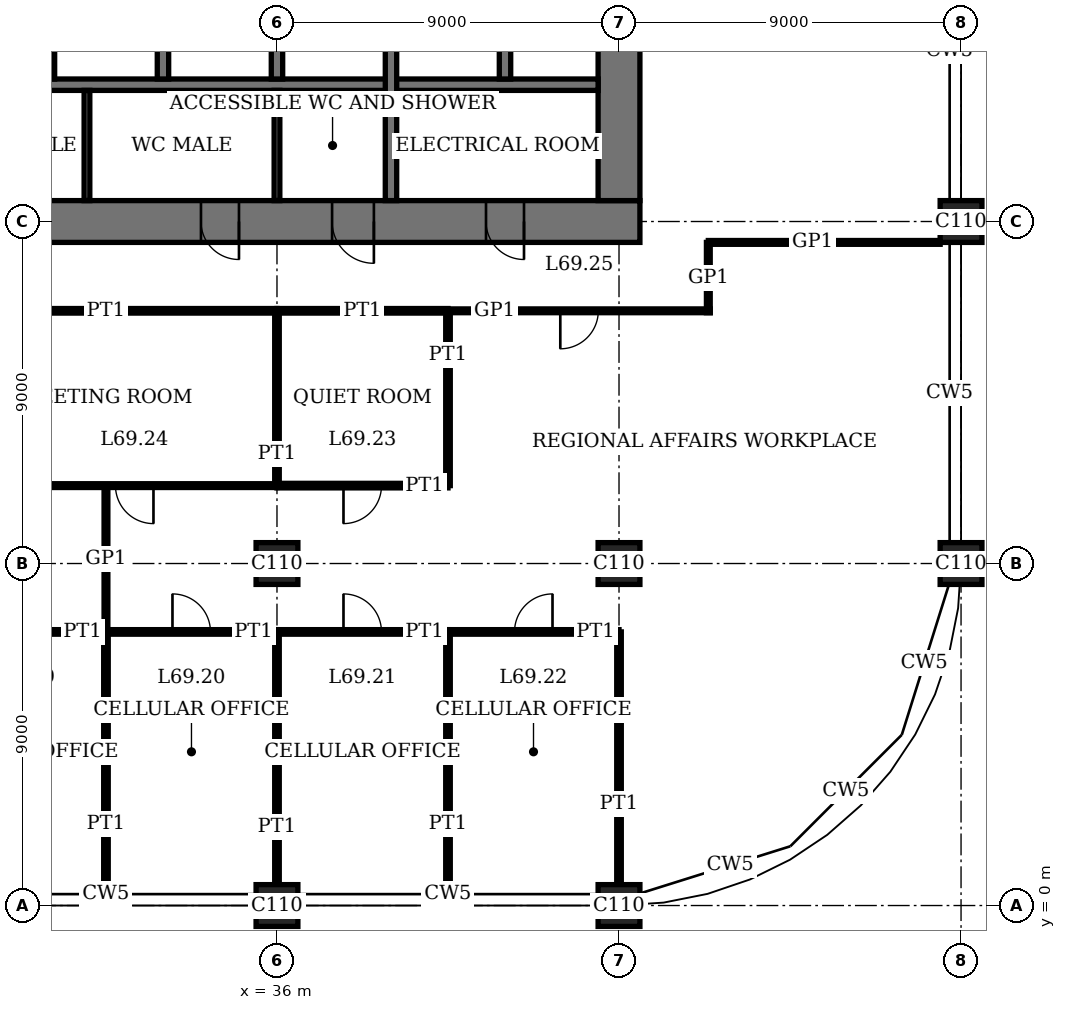
"""IFC4 building model, lengths in metres.
Left out: names, types, materials, properties, quantities, classifications, styles, units other than length and angle.
Written with IfcOpenShell. Run it as: python <this file> out.ifc"""

import sys

from ifc_helpers import new_model, si_unit, direction, frame, frame_2d, origin, origin_2d, place, context, subcontext, project, spatial, rectangle, extrude, element, fill, save


model = new_model("IFC4")
c1 = context("Model", 3, precision=1e-05, world=origin(), true_north=direction((0.0, 1.0)))
c2 = subcontext(c1, "Body", "Model", "MODEL_VIEW")
j1 = project(units=[si_unit("LENGTHUNIT", "METRE"), si_unit("PLANEANGLEUNIT", "RADIAN")], contexts=[c1])
p1 = place(None, origin())
s1 = spatial("IfcSite", under=j1, at=p1, CompositionType="ELEMENT")
p2 = place(p1, origin())
s2 = spatial("IfcBuilding", under=s1, at=p2, CompositionType="ELEMENT")
p3 = place(p2, frame((0.0, 0.0, 283.4)))
s3 = spatial("IfcBuildingStorey", under=s2, at=p3, CompositionType="ELEMENT", Elevation=283.4)
for number, where, z_axis, x_axis in (
    (1, (36.0, 0.0, 0.0), (0.0, 0.0, 1.0), (1.0, 0.0, 0.0)),
    (2, (36.0, 9.0, 0.0), (0.0, 0.0, 1.0), (1.0, 0.0, 0.0)),
    (3, (45.0, 0.0, 0.0), (0.0, 0.0, 1.0), (1.0, 0.0, 0.0)),
    (4, (45.0, 9.0, 0.0), (0.0, 0.0, 1.0), (1.0, 0.0, 0.0)),
    (5, (54.0, 9.0, 0.0), (0.0, 0.0, 1.0), (1.0, 0.0, 0.0)),
    (6, (54.0, 18.0, 0.0), (0.0, 0.0, 1.0), (1.0, 0.0, 0.0)),
):
    element("IfcColumn", number, at=place(p3, frame(where, z_axis=z_axis, x_axis=x_axis)), inside=s3, PredefinedType="COLUMN", context=c2, shape_type="SweptSolid", body=[
        extrude(rectangle(XDim=1.1, YDim=1.1, at=origin_2d()), origin(), (0.0, 0.0, 1.0), 4.0),
    ])
p4 = place(p3, frame((17.45, 18.0, 0.0), z_axis=(0.0, 0.0, 1.0), x_axis=(1.0, 0.0, 0.0)))
e7 = element("IfcWall", 7, at=p4, inside=s3, PredefinedType="SHEAR", context=c2, shape_type="SweptSolid", body=[
    extrude(rectangle(XDim=28.1, YDim=1.1, at=frame_2d((14.05, 0.0))), origin(), (0.0, 0.0, 1.0), 4.0),
])
p5 = place(p4, frame((11.55, 0.0, 0.0)))
e8 = element("IfcOpeningElement", 8, at=p5, cuts=e7, PredefinedType="OPENING", context=c2, shape_type="SweptSolid", body=[
    extrude(rectangle(XDim=1.0, YDim=2.4, at=frame_2d((0.5, 1.2))), frame((0.0, 0.56, 0.0), z_axis=(0.0, -1.0, 0.0), x_axis=(1.0, 0.0, 0.0)), (0.0, 0.0, 1.0), 1.12),
])
p6 = place(p4, frame((16.55, 0.0, 0.0)))
e9 = element("IfcOpeningElement", 9, at=p6, cuts=e7, PredefinedType="OPENING", context=c2, shape_type="SweptSolid", body=[
    extrude(rectangle(XDim=1.0, YDim=2.4, at=frame_2d((0.5, 1.2))), frame((0.0, 0.56, 0.0), z_axis=(0.0, -1.0, 0.0), x_axis=(1.0, 0.0, 0.0)), (0.0, 0.0, 1.0), 1.12),
])
p7 = place(p4, frame((20.0, 0.0, 0.0)))
e10 = element("IfcOpeningElement", 10, at=p7, cuts=e7, PredefinedType="OPENING", context=c2, shape_type="SweptSolid", body=[
    extrude(rectangle(XDim=1.1, YDim=2.4, at=frame_2d((0.55, 1.2))), frame((0.0, 0.56, 0.0), z_axis=(0.0, -1.0, 0.0), x_axis=(1.0, 0.0, 0.0)), (0.0, 0.0, 1.0), 1.12),
])
p8 = place(p4, frame((24.05, 0.0, 0.0)))
e11 = element("IfcOpeningElement", 11, at=p8, cuts=e7, PredefinedType="OPENING", context=c2, shape_type="SweptSolid", body=[
    extrude(rectangle(XDim=1.0, YDim=2.4, at=frame_2d((0.5, 1.2))), frame((0.0, 0.56, 0.0), z_axis=(0.0, -1.0, 0.0), x_axis=(1.0, 0.0, 0.0)), (0.0, 0.0, 1.0), 1.12),
])
p9 = place(p3, frame((45.0, 18.55, 0.0), z_axis=(0.0, 0.0, 1.0), x_axis=(0.0, 1.0, 0.0)))
e12 = element("IfcWall", 12, at=p9, inside=s3, PredefinedType="SHEAR", context=c2, shape_type="SweptSolid", body=[
    extrude(rectangle(XDim=16.9, YDim=1.1, at=frame_2d((8.45, 0.0))), origin(), (0.0, 0.0, 1.0), 4.0),
])
p10 = place(p9, frame((8.45, 0.0, 0.0)))
e13 = element("IfcOpeningElement", 13, at=p10, cuts=e12, PredefinedType="OPENING", context=c2, shape_type="SweptSolid", body=[
    extrude(rectangle(XDim=1.8, YDim=2.4, at=frame_2d((0.9, 1.2))), frame((0.0, 0.56, 0.0), z_axis=(0.0, -1.0, 0.0), x_axis=(1.0, 0.0, 0.0)), (0.0, 0.0, 1.0), 1.12),
])
p11 = place(p3, frame((27.15, 21.6, 0.0), z_axis=(0.0, 0.0, 1.0), x_axis=(1.0, 0.0, 0.0)))
e14 = element("IfcWall", 14, at=p11, inside=s3, PredefinedType="SHEAR", context=c2, shape_type="SweptSolid", body=[
    extrude(rectangle(XDim=17.3, YDim=0.3, at=frame_2d((8.65, 0.0))), origin(), (0.0, 0.0, 1.0), 4.0),
])
for number, where, z_axis, x_axis in (
    (15, (30.0, 21.75, 0.0), (0.0, 0.0, 1.0), (0.0, 1.0, 0.0)),
    (16, (33.0, 21.75, 0.0), (0.0, 0.0, 1.0), (0.0, 1.0, 0.0)),
    (17, (36.0, 21.75, 0.0), (0.0, 0.0, 1.0), (0.0, 1.0, 0.0)),
):
    element("IfcWall", number, at=place(p3, frame(where, z_axis=z_axis, x_axis=x_axis)), inside=s3, PredefinedType="SHEAR", context=c2, shape_type="SweptSolid", body=[
        extrude(rectangle(XDim=2.7, YDim=0.3, at=frame_2d((1.35, 0.0))), origin(), (0.0, 0.0, 1.0), 4.0),
    ])
p12 = place(p3, frame((39.0, 18.55, 0.0), z_axis=(0.0, 0.0, 1.0), x_axis=(0.0, 1.0, 0.0)))
e18 = element("IfcWall", 18, at=p12, inside=s3, PredefinedType="SHEAR", context=c2, shape_type="SweptSolid", body=[
    extrude(rectangle(XDim=5.9, YDim=0.3, at=frame_2d((2.95, 0.0))), origin(), (0.0, 0.0, 1.0), 4.0),
])
p13 = place(p3, frame((42.0, 21.75, 0.0), z_axis=(0.0, 0.0, 1.0), x_axis=(0.0, 1.0, 0.0)))
e19 = element("IfcWall", 19, at=p13, inside=s3, PredefinedType="SHEAR", context=c2, shape_type="SweptSolid", body=[
    extrude(rectangle(XDim=2.7, YDim=0.3, at=frame_2d((1.35, 0.0))), origin(), (0.0, 0.0, 1.0), 4.0),
])
p14 = place(p3, frame((27.0, 7.2, 0.0), z_axis=(0.0, 0.0, 1.0), x_axis=(1.0, 0.0, 0.0)))
e20 = element("IfcWall", 20, at=p14, inside=s3, PredefinedType="PARTITIONING", context=c2, shape_type="SweptSolid", body=[
    extrude(rectangle(XDim=4.5, YDim=0.12, at=frame_2d((2.25, 0.0))), origin(), (0.0, 0.0, 1.0), 3.75),
])
p15 = place(p14, frame((1.75, 0.0, 0.0)))
e21 = element("IfcOpeningElement", 21, at=p15, cuts=e20, PredefinedType="OPENING", context=c2, shape_type="SweptSolid", body=[
    extrude(rectangle(XDim=1.0, YDim=2.4, at=frame_2d((0.5, 1.2))), frame((0.0, 0.07, 0.0), z_axis=(0.0, -1.0, 0.0), x_axis=(1.0, 0.0, 0.0)), (0.0, 0.0, 1.0), 0.14),
])
p16 = place(p3, frame((31.5, 7.2, 0.0), z_axis=(0.0, 0.0, 1.0), x_axis=(1.0, 0.0, 0.0)))
e22 = element("IfcWall", 22, at=p16, inside=s3, PredefinedType="PARTITIONING", context=c2, shape_type="SweptSolid", body=[
    extrude(rectangle(XDim=4.5, YDim=0.12, at=frame_2d((2.25, 0.0))), origin(), (0.0, 0.0, 1.0), 3.75),
])
p17 = place(p16, frame((1.75, 0.0, 0.0)))
e23 = element("IfcOpeningElement", 23, at=p17, cuts=e22, PredefinedType="OPENING", context=c2, shape_type="SweptSolid", body=[
    extrude(rectangle(XDim=1.0, YDim=2.4, at=frame_2d((0.5, 1.2))), frame((0.0, 0.07, 0.0), z_axis=(0.0, -1.0, 0.0), x_axis=(1.0, 0.0, 0.0)), (0.0, 0.0, 1.0), 0.14),
])
p18 = place(p3, frame((36.0, 7.2, 0.0), z_axis=(0.0, 0.0, 1.0), x_axis=(1.0, 0.0, 0.0)))
e24 = element("IfcWall", 24, at=p18, inside=s3, PredefinedType="PARTITIONING", context=c2, shape_type="SweptSolid", body=[
    extrude(rectangle(XDim=4.5, YDim=0.12, at=frame_2d((2.25, 0.0))), origin(), (0.0, 0.0, 1.0), 3.75),
])
p19 = place(p18, frame((1.75, 0.0, 0.0)))
e25 = element("IfcOpeningElement", 25, at=p19, cuts=e24, PredefinedType="OPENING", context=c2, shape_type="SweptSolid", body=[
    extrude(rectangle(XDim=1.0, YDim=2.4, at=frame_2d((0.5, 1.2))), frame((0.0, 0.07, 0.0), z_axis=(0.0, -1.0, 0.0), x_axis=(1.0, 0.0, 0.0)), (0.0, 0.0, 1.0), 0.14),
])
p20 = place(p3, frame((40.5, 7.2, 0.0), z_axis=(0.0, 0.0, 1.0), x_axis=(1.0, 0.0, 0.0)))
e26 = element("IfcWall", 26, at=p20, inside=s3, PredefinedType="PARTITIONING", context=c2, shape_type="SweptSolid", body=[
    extrude(rectangle(XDim=4.5, YDim=0.12, at=frame_2d((2.25, 0.0))), origin(), (0.0, 0.0, 1.0), 3.75),
])
p21 = place(p20, frame((1.75, 0.0, 0.0)))
e27 = element("IfcOpeningElement", 27, at=p21, cuts=e26, PredefinedType="OPENING", context=c2, shape_type="SweptSolid", body=[
    extrude(rectangle(XDim=1.0, YDim=2.4, at=frame_2d((0.5, 1.2))), frame((0.0, 0.07, 0.0), z_axis=(0.0, -1.0, 0.0), x_axis=(1.0, 0.0, 0.0)), (0.0, 0.0, 1.0), 0.14),
])
p22 = place(p3, frame((36.0, 11.05, 0.0), z_axis=(0.0, 0.0, 1.0), x_axis=(1.0, 0.0, 0.0)))
e28 = element("IfcWall", 28, at=p22, inside=s3, PredefinedType="PARTITIONING", context=c2, shape_type="SweptSolid", body=[
    extrude(rectangle(XDim=4.5, YDim=0.12, at=frame_2d((2.25, 0.0))), origin(), (0.0, 0.0, 1.0), 3.75),
])
p23 = place(p22, frame((1.75, 0.0, 0.0)))
e29 = element("IfcOpeningElement", 29, at=p23, cuts=e28, PredefinedType="OPENING", context=c2, shape_type="SweptSolid", body=[
    extrude(rectangle(XDim=1.0, YDim=2.4, at=frame_2d((0.5, 1.2))), frame((0.0, 0.07, 0.0), z_axis=(0.0, -1.0, 0.0), x_axis=(1.0, 0.0, 0.0)), (0.0, 0.0, 1.0), 0.14),
])
p24 = place(p3, frame((27.0, 11.05, 0.0), z_axis=(0.0, 0.0, 1.0), x_axis=(1.0, 0.0, 0.0)))
e30 = element("IfcWall", 30, at=p24, inside=s3, PredefinedType="PARTITIONING", context=c2, shape_type="SweptSolid", body=[
    extrude(rectangle(XDim=9.0, YDim=0.1, at=frame_2d((4.5, 0.0))), origin(), (0.0, 0.0, 1.0), 3.75),
])
p25 = place(p24, frame((4.75, 0.0, 0.0)))
e31 = element("IfcOpeningElement", 31, at=p25, cuts=e30, PredefinedType="OPENING", context=c2, shape_type="SweptSolid", body=[
    extrude(rectangle(XDim=1.0, YDim=2.4, at=frame_2d((0.5, 1.2))), frame((0.0, 0.06, 0.0), z_axis=(0.0, -1.0, 0.0), x_axis=(1.0, 0.0, 0.0)), (0.0, 0.0, 1.0), 0.12),
])
p26 = place(p3, frame((27.0, 15.65, 0.0), z_axis=(0.0, 0.0, 1.0), x_axis=(1.0, 0.0, 0.0)))
e32 = element("IfcWall", 32, at=p26, inside=s3, PredefinedType="PARTITIONING", context=c2, shape_type="SweptSolid", body=[
    extrude(rectangle(XDim=9.0, YDim=0.12, at=frame_2d((4.5, 0.0))), origin(), (0.0, 0.0, 1.0), 3.75),
])
p27 = place(p3, frame((36.0, 15.65, 0.0), z_axis=(0.0, 0.0, 1.0), x_axis=(1.0, 0.0, 0.0)))
e33 = element("IfcWall", 33, at=p27, inside=s3, PredefinedType="PARTITIONING", context=c2, shape_type="SweptSolid", body=[
    extrude(rectangle(XDim=4.5, YDim=0.12, at=frame_2d((2.25, 0.0))), origin(), (0.0, 0.0, 1.0), 3.75),
])
p28 = place(p3, frame((40.51, 15.65, 0.0), z_axis=(0.0, 0.0, 1.0), x_axis=(1.0, 0.0, 0.0)))
e34 = element("IfcWall", 34, at=p28, inside=s3, PredefinedType="PARTITIONING", context=c2, shape_type="SweptSolid", body=[
    extrude(rectangle(XDim=6.89, YDim=0.1, at=frame_2d((3.445, 0.0))), origin(), (0.0, 0.0, 1.0), 3.75),
])
p29 = place(p28, frame((2.945, 0.0, 0.0)))
e35 = element("IfcOpeningElement", 35, at=p29, cuts=e34, PredefinedType="OPENING", context=c2, shape_type="SweptSolid", body=[
    extrude(rectangle(XDim=1.0, YDim=2.4, at=frame_2d((0.5, 1.2))), frame((0.0, 0.06, 0.0), z_axis=(0.0, -1.0, 0.0), x_axis=(1.0, 0.0, 0.0)), (0.0, 0.0, 1.0), 0.12),
])
p30 = place(p3, frame((47.35, 17.45, 0.0), z_axis=(0.0, 0.0, 1.0), x_axis=(1.0, 0.0, 0.0)))
e36 = element("IfcWall", 36, at=p30, inside=s3, PredefinedType="PARTITIONING", context=c2, shape_type="SweptSolid", body=[
    extrude(rectangle(XDim=6.1, YDim=0.1, at=frame_2d((3.05, 0.0))), origin(), (0.0, 0.0, 1.0), 3.75),
])
p31 = place(p3, frame((31.5, 0.31, 0.0), z_axis=(0.0, 0.0, 1.0), x_axis=(0.0, 1.0, 0.0)))
e37 = element("IfcWall", 37, at=p31, inside=s3, PredefinedType="PARTITIONING", context=c2, shape_type="SweptSolid", body=[
    extrude(rectangle(XDim=6.89, YDim=0.12, at=frame_2d((3.445, 0.0))), origin(), (0.0, 0.0, 1.0), 3.75),
])
p32 = place(p3, frame((31.5, 7.2, 0.0), z_axis=(0.0, 0.0, 1.0), x_axis=(0.0, 1.0, 0.0)))
e38 = element("IfcWall", 38, at=p32, inside=s3, PredefinedType="PARTITIONING", context=c2, shape_type="SweptSolid", body=[
    extrude(rectangle(XDim=3.86, YDim=0.1, at=frame_2d((1.93, 0.0))), origin(), (0.0, 0.0, 1.0), 3.75),
])
p33 = place(p3, frame((36.0, 0.55, 0.0), z_axis=(0.0, 0.0, 1.0), x_axis=(0.0, 1.0, 0.0)))
e39 = element("IfcWall", 39, at=p33, inside=s3, PredefinedType="PARTITIONING", context=c2, shape_type="SweptSolid", body=[
    extrude(rectangle(XDim=6.65, YDim=0.12, at=frame_2d((3.325, 0.0))), origin(), (0.0, 0.0, 1.0), 3.05),
])
p34 = place(p3, frame((36.0, 11.05, 0.0), z_axis=(0.0, 0.0, 1.0), x_axis=(0.0, 1.0, 0.0)))
e40 = element("IfcWall", 40, at=p34, inside=s3, PredefinedType="PARTITIONING", context=c2, shape_type="SweptSolid", body=[
    extrude(rectangle(XDim=4.6, YDim=0.12, at=frame_2d((2.3, 0.0))), origin(), (0.0, 0.0, 1.0), 3.05),
])
p35 = place(p3, frame((40.5, 0.31, 0.0), z_axis=(0.0, 0.0, 1.0), x_axis=(0.0, 1.0, 0.0)))
e41 = element("IfcWall", 41, at=p35, inside=s3, PredefinedType="PARTITIONING", context=c2, shape_type="SweptSolid", body=[
    extrude(rectangle(XDim=6.89, YDim=0.12, at=frame_2d((3.445, 0.0))), origin(), (0.0, 0.0, 1.0), 3.75),
])
p36 = place(p3, frame((40.5, 11.05, 0.0), z_axis=(0.0, 0.0, 1.0), x_axis=(0.0, 1.0, 0.0)))
e42 = element("IfcWall", 42, at=p36, inside=s3, PredefinedType="PARTITIONING", context=c2, shape_type="SweptSolid", body=[
    extrude(rectangle(XDim=4.6, YDim=0.12, at=frame_2d((2.3, 0.0))), origin(), (0.0, 0.0, 1.0), 3.75),
])
p37 = place(p3, frame((45.0, 0.55, 0.0), z_axis=(0.0, 0.0, 1.0), x_axis=(0.0, 1.0, 0.0)))
e43 = element("IfcWall", 43, at=p37, inside=s3, PredefinedType="PARTITIONING", context=c2, shape_type="SweptSolid", body=[
    extrude(rectangle(XDim=6.65, YDim=0.12, at=frame_2d((3.325, 0.0))), origin(), (0.0, 0.0, 1.0), 3.05),
])
p38 = place(p3, frame((47.35, 15.6, 0.0), z_axis=(0.0, 0.0, 1.0), x_axis=(0.0, 1.0, 0.0)))
e44 = element("IfcWall", 44, at=p38, inside=s3, PredefinedType="PARTITIONING", context=c2, shape_type="SweptSolid", body=[
    extrude(rectangle(XDim=1.85, YDim=0.1, at=frame_2d((0.925, 0.0))), origin(), (0.0, 0.0, 1.0), 3.75),
])
for number, where, z_axis, x_axis in (
    (45, (31.0, 18.55, 0.0), (0.0, 0.0, 1.0), (0.0, 1.0, 0.0)),
    (46, (36.0, 18.55, 0.0), (0.0, 0.0, 1.0), (0.0, 1.0, 0.0)),
):
    element("IfcWall", number, at=place(p3, frame(where, z_axis=z_axis, x_axis=x_axis)), inside=s3, PredefinedType="PARTITIONING", context=c2, shape_type="SweptSolid", body=[
        extrude(rectangle(XDim=2.9, YDim=0.15, at=frame_2d((1.45, 0.0))), origin(), (0.0, 0.0, 1.0), 3.75),
    ])
p39 = place(p6, origin())
e47 = element("IfcDoor", 47, at=p39, inside=s3, OperationType="SINGLE_SWING_RIGHT", PredefinedType="DOOR", context=c2, shape_type="SweptSolid", body=[
    extrude(rectangle(XDim=1.0, YDim=2.4, at=frame_2d((0.5, 1.2))), frame((0.0, 0.025, 0.0), z_axis=(0.0, -1.0, 0.0), x_axis=(1.0, 0.0, 0.0)), (0.0, 0.0, 1.0), 0.05),
    extrude(rectangle(XDim=0.04, YDim=2.4, at=frame_2d((0.02, 1.2))), frame((0.0, 0.4, 0.0), z_axis=(0.0, -1.0, 0.0), x_axis=(1.0, 0.0, 0.0)), (0.0, 0.0, 1.0), 0.8),
    extrude(rectangle(XDim=0.04, YDim=2.4, at=frame_2d((0.98, 1.2))), frame((0.0, 0.4, 0.0), z_axis=(0.0, -1.0, 0.0), x_axis=(1.0, 0.0, 0.0)), (0.0, 0.0, 1.0), 0.8),
    extrude(rectangle(XDim=1.0, YDim=0.04, at=frame_2d((0.5, 2.38))), frame((0.0, 0.4, 0.0), z_axis=(0.0, -1.0, 0.0), x_axis=(1.0, 0.0, 0.0)), (0.0, 0.0, 1.0), 0.8),
])
fill(e9, e47)
p40 = place(p7, origin())
e48 = element("IfcDoor", 48, at=p40, inside=s3, OperationType="SINGLE_SWING_RIGHT", PredefinedType="DOOR", context=c2, shape_type="SweptSolid", body=[
    extrude(rectangle(XDim=1.1, YDim=2.4, at=frame_2d((0.55, 1.2))), frame((0.0, 0.025, 0.0), z_axis=(0.0, -1.0, 0.0), x_axis=(1.0, 0.0, 0.0)), (0.0, 0.0, 1.0), 0.05),
    extrude(rectangle(XDim=0.04, YDim=2.4, at=frame_2d((0.02, 1.2))), frame((0.0, 0.44, 0.0), z_axis=(0.0, -1.0, 0.0), x_axis=(1.0, 0.0, 0.0)), (0.0, 0.0, 1.0), 0.88),
    extrude(rectangle(XDim=0.04, YDim=2.4, at=frame_2d((1.08, 1.2))), frame((0.0, 0.44, 0.0), z_axis=(0.0, -1.0, 0.0), x_axis=(1.0, 0.0, 0.0)), (0.0, 0.0, 1.0), 0.88),
    extrude(rectangle(XDim=1.1, YDim=0.04, at=frame_2d((0.55, 2.38))), frame((0.0, 0.44, 0.0), z_axis=(0.0, -1.0, 0.0), x_axis=(1.0, 0.0, 0.0)), (0.0, 0.0, 1.0), 0.88),
])
fill(e10, e48)
p41 = place(p8, origin())
e49 = element("IfcDoor", 49, at=p41, inside=s3, OperationType="SINGLE_SWING_RIGHT", PredefinedType="DOOR", context=c2, shape_type="SweptSolid", body=[
    extrude(rectangle(XDim=1.0, YDim=2.4, at=frame_2d((0.5, 1.2))), frame((0.0, 0.025, 0.0), z_axis=(0.0, -1.0, 0.0), x_axis=(1.0, 0.0, 0.0)), (0.0, 0.0, 1.0), 0.05),
    extrude(rectangle(XDim=0.04, YDim=2.4, at=frame_2d((0.02, 1.2))), frame((0.0, 0.4, 0.0), z_axis=(0.0, -1.0, 0.0), x_axis=(1.0, 0.0, 0.0)), (0.0, 0.0, 1.0), 0.8),
    extrude(rectangle(XDim=0.04, YDim=2.4, at=frame_2d((0.98, 1.2))), frame((0.0, 0.4, 0.0), z_axis=(0.0, -1.0, 0.0), x_axis=(1.0, 0.0, 0.0)), (0.0, 0.0, 1.0), 0.8),
    extrude(rectangle(XDim=1.0, YDim=0.04, at=frame_2d((0.5, 2.38))), frame((0.0, 0.4, 0.0), z_axis=(0.0, -1.0, 0.0), x_axis=(1.0, 0.0, 0.0)), (0.0, 0.0, 1.0), 0.8),
])
fill(e11, e49)
p42 = place(p17, origin())
e50 = element("IfcDoor", 50, at=p42, inside=s3, OperationType="SINGLE_SWING_RIGHT", PredefinedType="DOOR", context=c2, shape_type="SweptSolid", body=[
    extrude(rectangle(XDim=1.0, YDim=2.4, at=frame_2d((0.5, 1.2))), frame((0.0, 0.025, 0.0), z_axis=(0.0, -1.0, 0.0), x_axis=(1.0, 0.0, 0.0)), (0.0, 0.0, 1.0), 0.05),
])
fill(e23, e50)
p43 = place(p19, origin())
e51 = element("IfcDoor", 51, at=p43, inside=s3, OperationType="SINGLE_SWING_RIGHT", PredefinedType="DOOR", context=c2, shape_type="SweptSolid", body=[
    extrude(rectangle(XDim=1.0, YDim=2.4, at=frame_2d((0.5, 1.2))), frame((0.0, 0.025, 0.0), z_axis=(0.0, -1.0, 0.0), x_axis=(1.0, 0.0, 0.0)), (0.0, 0.0, 1.0), 0.05),
])
fill(e25, e51)
p44 = place(p21, origin())
e52 = element("IfcDoor", 52, at=p44, inside=s3, OperationType="SINGLE_SWING_LEFT", PredefinedType="DOOR", context=c2, shape_type="SweptSolid", body=[
    extrude(rectangle(XDim=1.0, YDim=2.4, at=frame_2d((0.5, 1.2))), frame((0.0, 0.025, 0.0), z_axis=(0.0, -1.0, 0.0), x_axis=(1.0, 0.0, 0.0)), (0.0, 0.0, 1.0), 0.05),
])
fill(e27, e52)
p45 = place(p23, origin())
e53 = element("IfcDoor", 53, at=p45, inside=s3, OperationType="SINGLE_SWING_LEFT", PredefinedType="DOOR", context=c2, shape_type="SweptSolid", body=[
    extrude(rectangle(XDim=1.0, YDim=2.4, at=frame_2d((0.5, 1.2))), frame((0.0, 0.025, 0.0), z_axis=(0.0, -1.0, 0.0), x_axis=(1.0, 0.0, 0.0)), (0.0, 0.0, 1.0), 0.05),
])
fill(e29, e53)
p46 = place(p25, origin())
e54 = element("IfcDoor", 54, at=p46, inside=s3, OperationType="SINGLE_SWING_RIGHT", PredefinedType="DOOR", context=c2, shape_type="SweptSolid", body=[
    extrude(rectangle(XDim=1.0, YDim=2.4, at=frame_2d((0.5, 1.2))), frame((0.0, 0.02, 0.0), z_axis=(0.0, -1.0, 0.0), x_axis=(1.0, 0.0, 0.0)), (0.0, 0.0, 1.0), 0.04),
])
fill(e31, e54)
p47 = place(p29, origin())
e55 = element("IfcDoor", 55, at=p47, inside=s3, OperationType="SINGLE_SWING_LEFT", PredefinedType="DOOR", context=c2, shape_type="SweptSolid", body=[
    extrude(rectangle(XDim=1.0, YDim=2.4, at=frame_2d((0.5, 1.2))), frame((0.0, 0.02, 0.0), z_axis=(0.0, -1.0, 0.0), x_axis=(1.0, 0.0, 0.0)), (0.0, 0.0, 1.0), 0.04),
])
fill(e35, e55)
save(model, sys.argv[1])
